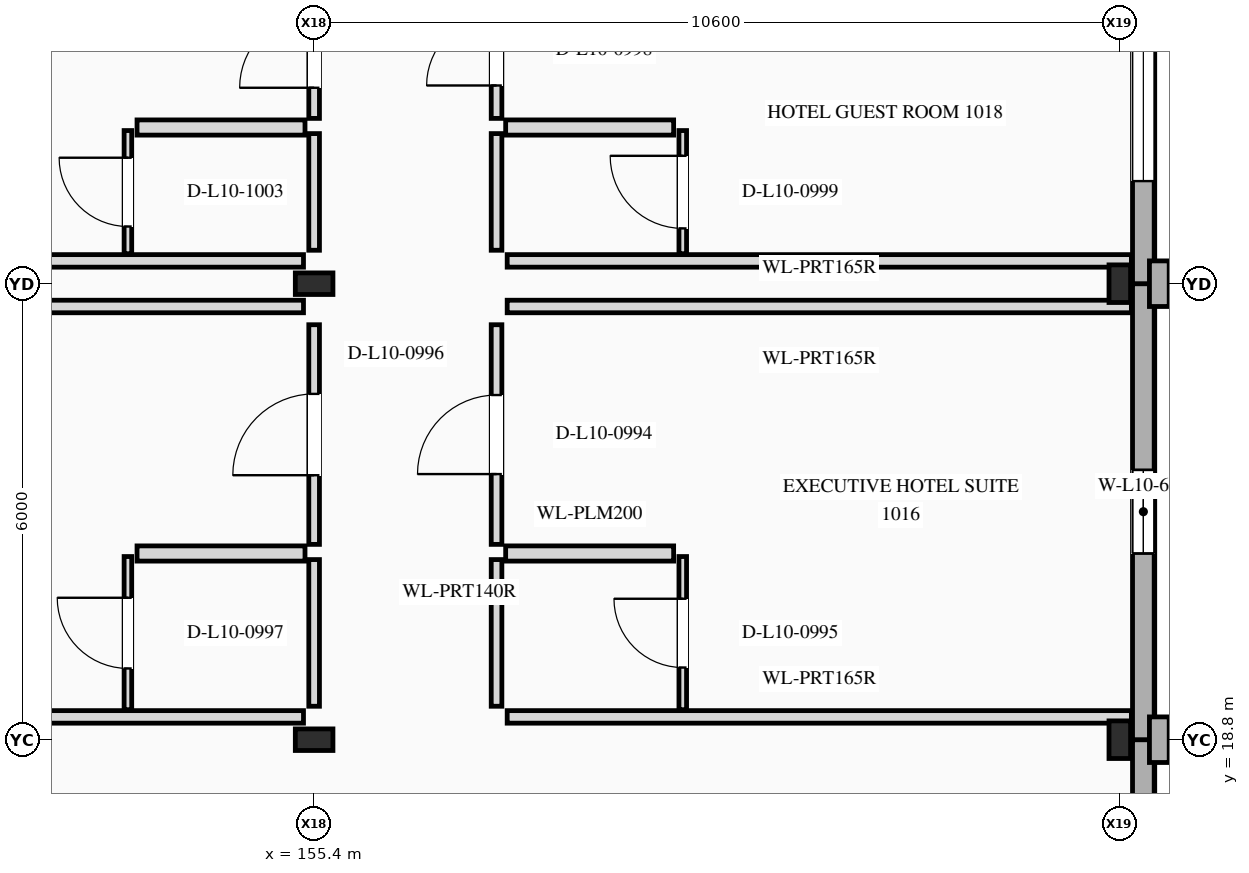
"""IFC4 building model, lengths in metres.
Left out: names, types, materials, properties, quantities, classifications, styles, units other than length and angle.
Written with IfcOpenShell. Run it as: python <this file> out.ifc"""

import sys

from ifc_helpers import new_model, si_unit, direction, frame, frame_2d, origin, origin_2d, place, context, subcontext, project, spatial, rectangle, i_section, extrude, element, fill, save


model = new_model("IFC4")
c1 = context("Model", 3, precision=1e-05, world=origin(), true_north=direction((0.0, 1.0)))
c2 = subcontext(c1, "Body", "Model", "MODEL_VIEW")
j1 = project(units=[si_unit("LENGTHUNIT", "METRE"), si_unit("PLANEANGLEUNIT", "RADIAN")], contexts=[c1])
p1 = place(None, origin())
s1 = spatial("IfcSite", under=j1, at=p1, CompositionType="ELEMENT")
p2 = place(p1, origin())
s2 = spatial("IfcBuilding", under=s1, at=p2, CompositionType="ELEMENT")
p3 = place(p2, frame((0.0, 0.0, 41.1)))
s3 = spatial("IfcBuildingStorey", under=s2, at=p3, CompositionType="ELEMENT", Elevation=41.1)
for number, where, z_axis, x_axis in (
    (1, (155.4, 18.8, 0.0), (0.0, 0.0, 1.0), (0.0, 1.0, 0.0)),
    (2, (155.4, 24.8, 0.0), (0.0, 0.0, 1.0), (0.0, 1.0, 0.0)),
    (3, (166.0, 18.8, 0.0), (0.0, 0.0, 1.0), (1.0, 0.0, 0.0)),
    (4, (166.0, 24.8, 0.0), (0.0, 0.0, 1.0), (1.0, 0.0, 0.0)),
):
    element("IfcColumn", number, at=place(p3, frame(where, z_axis=z_axis, x_axis=x_axis)), inside=s3, PredefinedType="COLUMN", context=c2, shape_type="SweptSolid", body=[
        extrude(i_section(OverallWidth=0.284, OverallDepth=0.495, WebThickness=0.019, FlangeThickness=0.033, at=origin_2d()), origin(), (0.0, 0.0, 1.0), 3.5),
    ])
p4 = place(p3, frame((166.31, 14.46, 0.0), z_axis=(0.0, 0.0, 1.0), x_axis=(0.0, 1.0, 0.0)))
e5 = element("IfcWall", 5, at=p4, inside=s3, PredefinedType="STANDARD", context=c2, shape_type="SweptSolid", body=[
    extrude(rectangle(XDim=4.34, YDim=0.285, at=frame_2d((2.17, 0.0))), origin(), (0.0, 0.0, 1.0), 3.5),
])
p5 = place(p4, frame((1.42, 0.0, 0.88)))
e6 = element("IfcOpeningElement", 6, at=p5, cuts=e5, PredefinedType="OPENING", context=c2, shape_type="SweptSolid", body=[
    extrude(rectangle(XDim=1.5, YDim=1.7, at=frame_2d((0.75, 0.85))), frame((0.0, 0.152, 0.0), z_axis=(0.0, -1.0, 0.0), x_axis=(1.0, 0.0, 0.0)), (0.0, 0.0, 1.0), 0.305),
])
p6 = place(p3, frame((166.31, 18.8, 0.0), z_axis=(0.0, 0.0, 1.0), x_axis=(0.0, 1.0, 0.0)))
e7 = element("IfcWall", 7, at=p6, inside=s3, PredefinedType="STANDARD", context=c2, shape_type="SweptSolid", body=[
    extrude(rectangle(XDim=6.0, YDim=0.285, at=frame_2d((3.0, 0.0))), origin(), (0.0, 0.0, 1.0), 3.5),
])
p7 = place(p6, frame((2.45, 0.0, 0.85)))
e8 = element("IfcOpeningElement", 8, at=p7, cuts=e7, PredefinedType="OPENING", context=c2, shape_type="SweptSolid", body=[
    extrude(rectangle(XDim=1.1, YDim=1.5, at=frame_2d((0.55, 0.75))), frame((0.0, 0.152, 0.0), z_axis=(0.0, -1.0, 0.0), x_axis=(1.0, 0.0, 0.0)), (0.0, 0.0, 1.0), 0.305),
])
p8 = place(p3, frame((166.52, 18.5, 0.0), z_axis=(0.0, 0.0, 1.0), x_axis=(0.0, 1.0, 0.0)))
e9 = element("IfcWall", 9, at=p8, inside=s3, PredefinedType="ELEMENTEDWALL", context=c2, shape_type="SweptSolid", body=[
    extrude(rectangle(XDim=0.6, YDim=0.26, at=frame_2d((0.3, 0.0))), origin(), (0.0, 0.0, 1.0), 3.5),
])
p9 = place(p3, frame((166.31, 24.8, 0.0), z_axis=(0.0, 0.0, 1.0), x_axis=(0.0, 1.0, 0.0)))
e10 = element("IfcWall", 10, at=p9, inside=s3, PredefinedType="STANDARD", context=c2, shape_type="SweptSolid", body=[
    extrude(rectangle(XDim=8.4, YDim=0.285, at=frame_2d((4.2, 0.0))), origin(), (0.0, 0.0, 1.0), 3.5),
])
p10 = place(p9, frame((1.35, 0.0, 0.85)))
e11 = element("IfcOpeningElement", 11, at=p10, cuts=e10, PredefinedType="OPENING", context=c2, shape_type="SweptSolid", body=[
    extrude(rectangle(XDim=1.8, YDim=1.8, at=frame_2d((0.9, 0.9))), frame((0.0, 0.152, 0.0), z_axis=(0.0, -1.0, 0.0), x_axis=(1.0, 0.0, 0.0)), (0.0, 0.0, 1.0), 0.305),
])
p11 = place(p9, frame((5.175, 0.0, 0.85)))
e12 = element("IfcOpeningElement", 12, at=p11, cuts=e10, PredefinedType="OPENING", context=c2, shape_type="SweptSolid", body=[
    extrude(rectangle(XDim=1.95, YDim=1.85, at=frame_2d((0.975, 0.925))), frame((0.0, 0.152, 0.0), z_axis=(0.0, -1.0, 0.0), x_axis=(1.0, 0.0, 0.0)), (0.0, 0.0, 1.0), 0.305),
])
p12 = place(p3, frame((166.52, 24.5, 0.0), z_axis=(0.0, 0.0, 1.0), x_axis=(0.0, 1.0, 0.0)))
e13 = element("IfcWall", 13, at=p12, inside=s3, PredefinedType="ELEMENTEDWALL", context=c2, shape_type="SweptSolid", body=[
    extrude(rectangle(XDim=0.6, YDim=0.26, at=frame_2d((0.3, 0.0))), origin(), (0.0, 0.0, 1.0), 3.5),
])
p13 = place(p3, frame((157.8, 19.24, 0.0), z_axis=(0.0, 0.0, 1.0), x_axis=(0.0, 1.0, 0.0)))
e14 = element("IfcWall", 14, at=p13, inside=s3, PredefinedType="PARTITIONING", context=c2, shape_type="SweptSolid", body=[
    extrude(rectangle(XDim=1.93, YDim=0.14, at=frame_2d((0.965, 0.0))), origin(), (0.0, 0.0, 1.0), 2.738),
])
p14 = place(p3, frame((157.8, 21.37, 0.0), z_axis=(0.0, 0.0, 1.0), x_axis=(0.0, 1.0, 0.0)))
e15 = element("IfcWall", 15, at=p14, inside=s3, PredefinedType="PARTITIONING", context=c2, shape_type="SweptSolid", body=[
    extrude(rectangle(XDim=2.89, YDim=0.14, at=frame_2d((1.445, 0.0))), origin(), (0.0, 0.0, 1.0), 2.738),
])
p15 = place(p14, frame((0.925, 0.0, 0.0)))
e16 = element("IfcOpeningElement", 16, at=p15, cuts=e15, PredefinedType="OPENING", context=c2, shape_type="SweptSolid", body=[
    extrude(rectangle(XDim=1.04, YDim=2.25, at=frame_2d((0.52, 1.125))), frame((0.0, 0.08, 0.0), z_axis=(0.0, -1.0, 0.0), x_axis=(1.0, 0.0, 0.0)), (0.0, 0.0, 1.0), 0.16),
])
for number, where, z_axis, x_axis in (
    (17, (157.94, 19.1, 0.0), (0.0, 0.0, 1.0), (1.0, 0.0, 0.0)),
    (18, (157.94, 24.5, 0.0), (0.0, 0.0, 1.0), (1.0, 0.0, 0.0)),
):
    element("IfcWall", number, at=place(p3, frame(where, z_axis=z_axis, x_axis=x_axis)), inside=s3, PredefinedType="PARTITIONING", context=c2, shape_type="SweptSolid", body=[
        extrude(rectangle(XDim=8.213, YDim=0.165, at=frame_2d((4.106, 0.0))), origin(), (0.0, 0.0, 1.0), 2.57),
    ])
p16 = place(p3, frame((157.92, 21.25, 0.0), z_axis=(0.0, 0.0, 1.0), x_axis=(1.0, 0.0, 0.0)))
e19 = element("IfcWall", 19, at=p16, inside=s3, PredefinedType="PLUMBINGWALL", context=c2, shape_type="SweptSolid", body=[
    extrude(rectangle(XDim=2.21, YDim=0.2, at=frame_2d((1.105, 0.0))), origin(), (0.0, 0.0, 1.0), 3.18),
])
p17 = place(p3, frame((160.25, 19.195, 0.0), z_axis=(0.0, 0.0, 1.0), x_axis=(0.0, 1.0, 0.0)))
e20 = element("IfcWall", 20, at=p17, inside=s3, PredefinedType="PARTITIONING", context=c2, shape_type="SweptSolid", body=[
    extrude(rectangle(XDim=2.015, YDim=0.1, at=frame_2d((1.008, 0.0))), origin(), (0.0, 0.0, 1.0), 2.738),
])
p18 = place(p17, frame((0.555, 0.0, 0.0)))
e21 = element("IfcOpeningElement", 21, at=p18, cuts=e20, PredefinedType="OPENING", context=c2, shape_type="SweptSolid", body=[
    extrude(rectangle(XDim=0.905, YDim=2.1, at=frame_2d((0.453, 1.05))), frame((0.0, 0.06, 0.0), z_axis=(0.0, -1.0, 0.0), x_axis=(1.0, 0.0, 0.0)), (0.0, 0.0, 1.0), 0.12),
])
p19 = place(p3, frame((155.4, 19.24, 0.0), z_axis=(0.0, 0.0, 1.0), x_axis=(0.0, 1.0, 0.0)))
e22 = element("IfcWall", 22, at=p19, inside=s3, PredefinedType="PARTITIONING", context=c2, shape_type="SweptSolid", body=[
    extrude(rectangle(XDim=1.93, YDim=0.14, at=frame_2d((0.965, 0.0))), origin(), (0.0, 0.0, 1.0), 2.654),
])
p20 = place(p3, frame((155.4, 21.37, 0.0), z_axis=(0.0, 0.0, 1.0), x_axis=(0.0, 1.0, 0.0)))
e23 = element("IfcWall", 23, at=p20, inside=s3, PredefinedType="PARTITIONING", context=c2, shape_type="SweptSolid", body=[
    extrude(rectangle(XDim=2.89, YDim=0.14, at=frame_2d((1.445, 0.0))), origin(), (0.0, 0.0, 1.0), 2.654),
])
p21 = place(p20, frame((0.91, 0.0, 0.0)))
e24 = element("IfcOpeningElement", 24, at=p21, cuts=e23, PredefinedType="OPENING", context=c2, shape_type="SweptSolid", body=[
    extrude(rectangle(XDim=1.07, YDim=2.25, at=frame_2d((0.535, 1.125))), frame((0.0, 0.08, 0.0), z_axis=(0.0, -1.0, 0.0), x_axis=(1.0, 0.0, 0.0)), (0.0, 0.0, 1.0), 0.16),
])
p22 = place(p3, frame((147.04, 19.1, 0.0), z_axis=(0.0, 0.0, 1.0), x_axis=(1.0, 0.0, 0.0)))
e25 = element("IfcWall", 25, at=p22, inside=s3, PredefinedType="PARTITIONING", context=c2, shape_type="SweptSolid", body=[
    extrude(rectangle(XDim=8.22, YDim=0.165, at=frame_2d((4.11, 0.0))), origin(), (0.0, 0.0, 1.0), 3.18),
])
p23 = place(p3, frame((147.048, 24.5, 0.0), z_axis=(0.0, 0.0, 1.0), x_axis=(1.0, 0.0, 0.0)))
e26 = element("IfcWall", 26, at=p23, inside=s3, PredefinedType="PARTITIONING", context=c2, shape_type="SweptSolid", body=[
    extrude(rectangle(XDim=8.212, YDim=0.165, at=frame_2d((4.106, 0.0))), origin(), (0.0, 0.0, 1.0), 2.593),
])
p24 = place(p3, frame((153.07, 21.25, 0.0), z_axis=(0.0, 0.0, 1.0), x_axis=(1.0, 0.0, 0.0)))
e27 = element("IfcWall", 27, at=p24, inside=s3, PredefinedType="PLUMBINGWALL", context=c2, shape_type="SweptSolid", body=[
    extrude(rectangle(XDim=2.21, YDim=0.2, at=frame_2d((1.105, 0.0))), origin(), (0.0, 0.0, 1.0), 3.18),
])
p25 = place(p3, frame((152.95, 19.195, 0.0), z_axis=(0.0, 0.0, 1.0), x_axis=(0.0, 1.0, 0.0)))
e28 = element("IfcWall", 28, at=p25, inside=s3, PredefinedType="PARTITIONING", context=c2, shape_type="SweptSolid", body=[
    extrude(rectangle(XDim=2.015, YDim=0.1, at=frame_2d((1.008, 0.0))), origin(), (0.0, 0.0, 1.0), 3.18),
])
p26 = place(p25, frame((0.543, 0.0, 0.0)))
e29 = element("IfcOpeningElement", 29, at=p26, cuts=e28, PredefinedType="OPENING", context=c2, shape_type="SweptSolid", body=[
    extrude(rectangle(XDim=0.93, YDim=2.14, at=frame_2d((0.465, 1.07))), frame((0.0, 0.06, 0.0), z_axis=(0.0, -1.0, 0.0), x_axis=(1.0, 0.0, 0.0)), (0.0, 0.0, 1.0), 0.12),
])
p27 = place(p3, frame((157.8, 25.24, 0.0), z_axis=(0.0, 0.0, 1.0), x_axis=(0.0, 1.0, 0.0)))
e30 = element("IfcWall", 30, at=p27, inside=s3, PredefinedType="PARTITIONING", context=c2, shape_type="SweptSolid", body=[
    extrude(rectangle(XDim=1.535, YDim=0.14, at=frame_2d((0.768, 0.0))), origin(), (0.0, 0.0, 1.0), 2.738),
])
p28 = place(p3, frame((157.8, 26.975, 0.0), z_axis=(0.0, 0.0, 1.0), x_axis=(0.0, 1.0, 0.0)))
e31 = element("IfcWall", 31, at=p28, inside=s3, PredefinedType="PARTITIONING", context=c2, shape_type="SweptSolid", body=[
    extrude(rectangle(XDim=1.785, YDim=0.14, at=frame_2d((0.893, 0.0))), origin(), (0.0, 0.0, 1.0), 2.738),
])
p29 = place(p28, frame((0.433, 0.0, 0.0)))
e32 = element("IfcOpeningElement", 32, at=p29, cuts=e31, PredefinedType="OPENING", context=c2, shape_type="SweptSolid", body=[
    extrude(rectangle(XDim=0.92, YDim=2.3, at=frame_2d((0.46, 1.15))), frame((0.0, 0.08, 0.0), z_axis=(0.0, -1.0, 0.0), x_axis=(1.0, 0.0, 0.0)), (0.0, 0.0, 1.0), 0.16),
])
p30 = place(p3, frame((157.94, 25.1, 0.0), z_axis=(0.0, 0.0, 1.0), x_axis=(1.0, 0.0, 0.0)))
e33 = element("IfcWall", 33, at=p30, inside=s3, PredefinedType="PARTITIONING", context=c2, shape_type="SweptSolid", body=[
    extrude(rectangle(XDim=8.213, YDim=0.165, at=frame_2d((4.106, 0.0))), origin(), (0.0, 0.0, 1.0), 2.57),
])
p31 = place(p3, frame((157.92, 26.855, 0.0), z_axis=(0.0, 0.0, 1.0), x_axis=(1.0, 0.0, 0.0)))
e34 = element("IfcWall", 34, at=p31, inside=s3, PredefinedType="PLUMBINGWALL", context=c2, shape_type="SweptSolid", body=[
    extrude(rectangle(XDim=2.21, YDim=0.2, at=frame_2d((1.105, 0.0))), origin(), (0.0, 0.0, 1.0), 3.18),
])
p32 = place(p3, frame((160.25, 25.195, 0.0), z_axis=(0.0, 0.0, 1.0), x_axis=(0.0, 1.0, 0.0)))
e35 = element("IfcWall", 35, at=p32, inside=s3, PredefinedType="PARTITIONING", context=c2, shape_type="SweptSolid", body=[
    extrude(rectangle(XDim=1.62, YDim=0.1, at=frame_2d((0.81, 0.0))), origin(), (0.0, 0.0, 1.0), 2.738),
])
p33 = place(p32, frame((0.333, 0.0, 0.0)))
e36 = element("IfcOpeningElement", 36, at=p33, cuts=e35, PredefinedType="OPENING", context=c2, shape_type="SweptSolid", body=[
    extrude(rectangle(XDim=0.955, YDim=2.14, at=frame_2d((0.478, 1.07))), frame((0.0, 0.06, 0.0), z_axis=(0.0, -1.0, 0.0), x_axis=(1.0, 0.0, 0.0)), (0.0, 0.0, 1.0), 0.12),
])
p34 = place(p3, frame((155.4, 25.24, 0.0), z_axis=(0.0, 0.0, 1.0), x_axis=(0.0, 1.0, 0.0)))
e37 = element("IfcWall", 37, at=p34, inside=s3, PredefinedType="PARTITIONING", context=c2, shape_type="SweptSolid", body=[
    extrude(rectangle(XDim=1.535, YDim=0.14, at=frame_2d((0.768, 0.0))), origin(), (0.0, 0.0, 1.0), 2.654),
])
p35 = place(p3, frame((155.4, 26.975, 0.0), z_axis=(0.0, 0.0, 1.0), x_axis=(0.0, 1.0, 0.0)))
e38 = element("IfcWall", 38, at=p35, inside=s3, PredefinedType="PARTITIONING", context=c2, shape_type="SweptSolid", body=[
    extrude(rectangle(XDim=1.785, YDim=0.14, at=frame_2d((0.893, 0.0))), origin(), (0.0, 0.0, 1.0), 2.654),
])
p36 = place(p35, frame((0.403, 0.0, 0.0)))
e39 = element("IfcOpeningElement", 39, at=p36, cuts=e38, PredefinedType="OPENING", context=c2, shape_type="SweptSolid", body=[
    extrude(rectangle(XDim=0.98, YDim=2.35, at=frame_2d((0.49, 1.175))), frame((0.0, 0.08, 0.0), z_axis=(0.0, -1.0, 0.0), x_axis=(1.0, 0.0, 0.0)), (0.0, 0.0, 1.0), 0.16),
])
p37 = place(p3, frame((147.048, 25.1, 0.0), z_axis=(0.0, 0.0, 1.0), x_axis=(1.0, 0.0, 0.0)))
e40 = element("IfcWall", 40, at=p37, inside=s3, PredefinedType="PARTITIONING", context=c2, shape_type="SweptSolid", body=[
    extrude(rectangle(XDim=8.212, YDim=0.165, at=frame_2d((4.106, 0.0))), origin(), (0.0, 0.0, 1.0), 2.593),
])
p38 = place(p3, frame((153.07, 26.855, 0.0), z_axis=(0.0, 0.0, 1.0), x_axis=(1.0, 0.0, 0.0)))
e41 = element("IfcWall", 41, at=p38, inside=s3, PredefinedType="PLUMBINGWALL", context=c2, shape_type="SweptSolid", body=[
    extrude(rectangle(XDim=2.21, YDim=0.2, at=frame_2d((1.105, 0.0))), origin(), (0.0, 0.0, 1.0), 3.18),
])
p39 = place(p3, frame((152.95, 25.195, 0.0), z_axis=(0.0, 0.0, 1.0), x_axis=(0.0, 1.0, 0.0)))
e42 = element("IfcWall", 42, at=p39, inside=s3, PredefinedType="PARTITIONING", context=c2, shape_type="SweptSolid", body=[
    extrude(rectangle(XDim=1.62, YDim=0.1, at=frame_2d((0.81, 0.0))), origin(), (0.0, 0.0, 1.0), 2.788),
])
p40 = place(p39, frame((0.358, 0.0, 0.0)))
e43 = element("IfcOpeningElement", 43, at=p40, cuts=e42, PredefinedType="OPENING", context=c2, shape_type="SweptSolid", body=[
    extrude(rectangle(XDim=0.905, YDim=2.18, at=frame_2d((0.453, 1.09))), frame((0.0, 0.06, 0.0), z_axis=(0.0, -1.0, 0.0), x_axis=(1.0, 0.0, 0.0)), (0.0, 0.0, 1.0), 0.12),
])
p41 = place(p7, origin())
e44 = element("IfcWindow", 44, at=p41, inside=s3, PartitioningType="SINGLE_PANEL", PredefinedType="WINDOW", context=c2, shape_type="SweptSolid", body=[
    extrude(rectangle(XDim=1.1, YDim=1.5, at=frame_2d((0.55, 0.75))), frame((0.0, 0.03, 0.0), z_axis=(0.0, -1.0, 0.0), x_axis=(1.0, 0.0, 0.0)), (0.0, 0.0, 1.0), 0.06),
])
fill(e8, e44)
p42 = place(p10, origin())
e45 = element("IfcWindow", 45, at=p42, inside=s3, PartitioningType="SINGLE_PANEL", PredefinedType="WINDOW", context=c2, shape_type="SweptSolid", body=[
    extrude(rectangle(XDim=1.8, YDim=1.8, at=frame_2d((0.9, 0.9))), frame((0.0, 0.03, 0.0), z_axis=(0.0, -1.0, 0.0), x_axis=(1.0, 0.0, 0.0)), (0.0, 0.0, 1.0), 0.06),
])
fill(e11, e45)
p43 = place(p15, origin())
e46 = element("IfcDoor", 46, at=p43, inside=s3, OperationType="SINGLE_SWING_LEFT", PredefinedType="DOOR", context=c2, shape_type="SweptSolid", body=[
    extrude(rectangle(XDim=1.04, YDim=2.25, at=frame_2d((0.52, 1.125))), frame((0.0, 0.025, 0.0), z_axis=(0.0, -1.0, 0.0), x_axis=(1.0, 0.0, 0.0)), (0.0, 0.0, 1.0), 0.05),
])
fill(e16, e46)
p44 = place(p18, origin())
e47 = element("IfcDoor", 47, at=p44, inside=s3, OperationType="SINGLE_SWING_RIGHT", PredefinedType="DOOR", context=c2, shape_type="SweptSolid", body=[
    extrude(rectangle(XDim=0.905, YDim=2.1, at=frame_2d((0.453, 1.05))), frame((0.0, 0.025, 0.0), z_axis=(0.0, -1.0, 0.0), x_axis=(1.0, 0.0, 0.0)), (0.0, 0.0, 1.0), 0.05),
])
fill(e21, e47)
p45 = place(p21, origin())
e48 = element("IfcDoor", 48, at=p45, inside=s3, OperationType="SINGLE_SWING_LEFT", PredefinedType="DOOR", context=c2, shape_type="SweptSolid", body=[
    extrude(rectangle(XDim=1.07, YDim=2.25, at=frame_2d((0.535, 1.125))), frame((0.0, 0.025, 0.0), z_axis=(0.0, -1.0, 0.0), x_axis=(1.0, 0.0, 0.0)), (0.0, 0.0, 1.0), 0.05),
])
fill(e24, e48)
p46 = place(p26, origin())
e49 = element("IfcDoor", 49, at=p46, inside=s3, OperationType="SINGLE_SWING_RIGHT", PredefinedType="DOOR", context=c2, shape_type="SweptSolid", body=[
    extrude(rectangle(XDim=0.93, YDim=2.14, at=frame_2d((0.465, 1.07))), frame((0.0, 0.025, 0.0), z_axis=(0.0, -1.0, 0.0), x_axis=(1.0, 0.0, 0.0)), (0.0, 0.0, 1.0), 0.05),
])
fill(e29, e49)
p47 = place(p29, origin())
e50 = element("IfcDoor", 50, at=p47, inside=s3, OperationType="SINGLE_SWING_LEFT", PredefinedType="DOOR", context=c2, shape_type="SweptSolid", body=[
    extrude(rectangle(XDim=0.92, YDim=2.3, at=frame_2d((0.46, 1.15))), frame((0.0, 0.025, 0.0), z_axis=(0.0, -1.0, 0.0), x_axis=(1.0, 0.0, 0.0)), (0.0, 0.0, 1.0), 0.05),
])
fill(e32, e50)
p48 = place(p33, origin())
e51 = element("IfcDoor", 51, at=p48, inside=s3, OperationType="SINGLE_SWING_RIGHT", PredefinedType="DOOR", context=c2, shape_type="SweptSolid", body=[
    extrude(rectangle(XDim=0.955, YDim=2.14, at=frame_2d((0.478, 1.07))), frame((0.0, 0.025, 0.0), z_axis=(0.0, -1.0, 0.0), x_axis=(1.0, 0.0, 0.0)), (0.0, 0.0, 1.0), 0.05),
])
fill(e36, e51)
p49 = place(p36, origin())
e52 = element("IfcDoor", 52, at=p49, inside=s3, OperationType="SINGLE_SWING_LEFT", PredefinedType="DOOR", context=c2, shape_type="SweptSolid", body=[
    extrude(rectangle(XDim=0.98, YDim=2.35, at=frame_2d((0.49, 1.175))), frame((0.0, 0.025, 0.0), z_axis=(0.0, -1.0, 0.0), x_axis=(1.0, 0.0, 0.0)), (0.0, 0.0, 1.0), 0.05),
])
fill(e39, e52)
p50 = place(p40, origin())
e53 = element("IfcDoor", 53, at=p50, inside=s3, OperationType="SINGLE_SWING_RIGHT", PredefinedType="DOOR", context=c2, shape_type="SweptSolid", body=[
    extrude(rectangle(XDim=0.905, YDim=2.18, at=frame_2d((0.453, 1.09))), frame((0.0, 0.025, 0.0), z_axis=(0.0, -1.0, 0.0), x_axis=(1.0, 0.0, 0.0)), (0.0, 0.0, 1.0), 0.05),
])
fill(e43, e53)
save(model, sys.argv[1])
